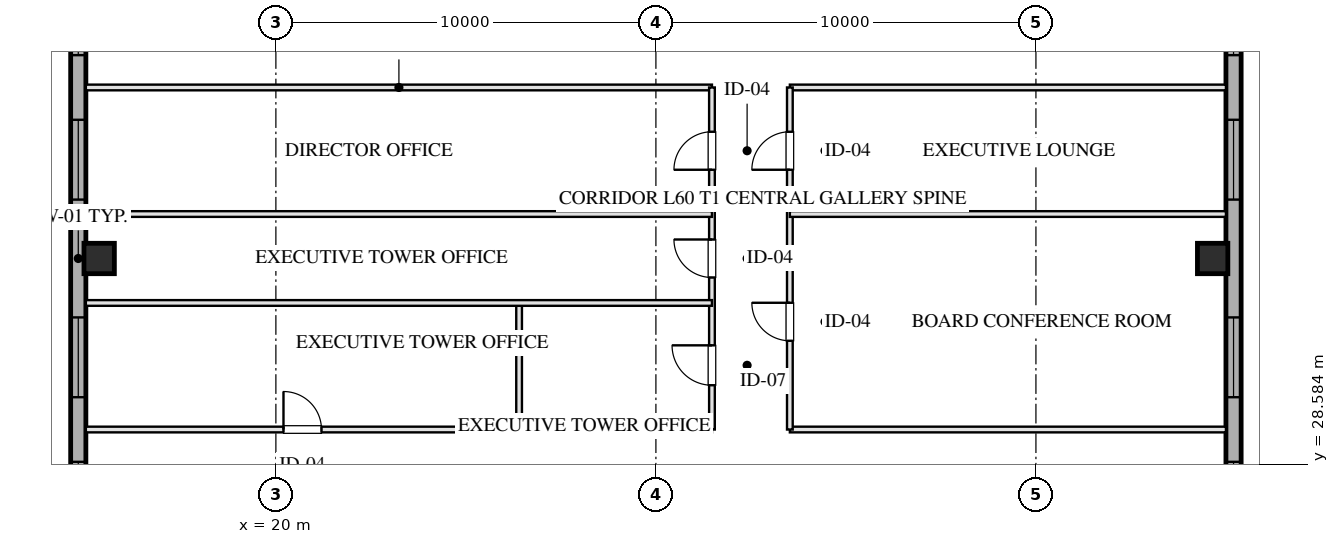
"""IFC4 building model, lengths in metres.
Left out: names, types, materials, properties, quantities, classifications, styles, units other than length and angle.
Written with IfcOpenShell. Run it as: python <this file> out.ifc"""

import sys

from ifc_helpers import new_model, si_unit, direction, frame, frame_2d, origin, origin_2d, place, context, subcontext, project, spatial, rectangle, hollow_rectangle, extrude, element, fill, save


model = new_model("IFC4")
c1 = context("Model", 3, precision=1e-05, world=origin(), true_north=direction((0.0, 1.0)))
c2 = subcontext(c1, "Body", "Model", "MODEL_VIEW")
j1 = project(units=[si_unit("LENGTHUNIT", "METRE"), si_unit("PLANEANGLEUNIT", "RADIAN")], contexts=[c1])
p1 = place(None, origin())
s1 = spatial("IfcSite", under=j1, at=p1, CompositionType="ELEMENT")
p2 = place(p1, origin())
s2 = spatial("IfcBuilding", under=s1, at=p2, CompositionType="ELEMENT")
p3 = place(p2, frame((0.0, 0.0, 223.1)))
s3 = spatial("IfcBuildingStorey", under=s2, at=p3, CompositionType="ELEMENT", Elevation=223.1)
for number, where, z_axis, x_axis in (
    (1, (15.35, 34.0, 0.0), (0.0, 0.0, 1.0), (1.0, 0.0, 0.0)),
    (2, (44.65, 34.0, 0.0), (0.0, 0.0, 1.0), (1.0, 0.0, 0.0)),
):
    element("IfcColumn", number, at=place(p3, frame(where, z_axis=z_axis, x_axis=x_axis)), inside=s3, PredefinedType="COLUMN", context=c2, shape_type="SweptSolid", body=[
        extrude(hollow_rectangle(XDim=0.8, YDim=0.8, WallThickness=0.028, at=origin_2d()), origin(), (0.0, 0.0, 1.0), 3.451),
    ])
p4 = place(p3, frame((14.8, 13.1, 0.0), z_axis=(0.0, 0.0, 1.0), x_axis=(0.0, 1.0, 0.0)))
e3 = element("IfcWall", 3, at=p4, inside=s3, PredefinedType="SOLIDWALL", context=c2, shape_type="SweptSolid", body=[
    extrude(rectangle(XDim=41.8, YDim=0.4, at=frame_2d((20.9, 0.0))), origin(), (0.0, 0.0, 1.0), 2.61),
])
p5 = place(p4, frame((13.45, 0.0, 0.75)))
e4 = element("IfcOpeningElement", 4, at=p5, cuts=e3, PredefinedType="OPENING", context=c2, shape_type="SweptSolid", body=[
    extrude(rectangle(XDim=2.1, YDim=1.46, at=frame_2d((1.05, 0.73))), frame((0.0, 0.21, 0.0), z_axis=(0.0, -1.0, 0.0), x_axis=(1.0, 0.0, 0.0)), (0.0, 0.0, 1.0), 0.42),
])
p6 = place(p4, frame((17.25, 0.0, 0.75)))
e5 = element("IfcOpeningElement", 5, at=p6, cuts=e3, PredefinedType="OPENING", context=c2, shape_type="SweptSolid", body=[
    extrude(rectangle(XDim=2.1, YDim=1.46, at=frame_2d((1.05, 0.73))), frame((0.0, 0.21, 0.0), z_axis=(0.0, -1.0, 0.0), x_axis=(1.0, 0.0, 0.0)), (0.0, 0.0, 1.0), 0.42),
])
p7 = place(p4, frame((22.45, 0.0, 0.75)))
e6 = element("IfcOpeningElement", 6, at=p7, cuts=e3, PredefinedType="OPENING", context=c2, shape_type="SweptSolid", body=[
    extrude(rectangle(XDim=2.1, YDim=1.46, at=frame_2d((1.05, 0.73))), frame((0.0, 0.21, 0.0), z_axis=(0.0, -1.0, 0.0), x_axis=(1.0, 0.0, 0.0)), (0.0, 0.0, 1.0), 0.42),
])
p8 = place(p4, frame((26.25, 0.0, 0.75)))
e7 = element("IfcOpeningElement", 7, at=p8, cuts=e3, PredefinedType="OPENING", context=c2, shape_type="SweptSolid", body=[
    extrude(rectangle(XDim=2.1, YDim=1.46, at=frame_2d((1.05, 0.73))), frame((0.0, 0.21, 0.0), z_axis=(0.0, -1.0, 0.0), x_axis=(1.0, 0.0, 0.0)), (0.0, 0.0, 1.0), 0.42),
])
p9 = place(p3, frame((45.2, 54.9, 0.0), z_axis=(0.0, 0.0, 1.0), x_axis=(0.0, -1.0, 0.0)))
e8 = element("IfcWall", 8, at=p9, inside=s3, PredefinedType="SOLIDWALL", context=c2, shape_type="SweptSolid", body=[
    extrude(rectangle(XDim=41.8, YDim=0.4, at=frame_2d((20.9, 0.0))), origin(), (0.0, 0.0, 1.0), 2.61),
])
p10 = place(p9, frame((26.25, 0.0, 0.75)))
e9 = element("IfcOpeningElement", 9, at=p10, cuts=e8, PredefinedType="OPENING", context=c2, shape_type="SweptSolid", body=[
    extrude(rectangle(XDim=2.1, YDim=1.46, at=frame_2d((1.05, 0.73))), frame((0.0, 0.21, 0.0), z_axis=(0.0, -1.0, 0.0), x_axis=(1.0, 0.0, 0.0)), (0.0, 0.0, 1.0), 0.42),
])
p11 = place(p9, frame((22.45, 0.0, 0.75)))
e10 = element("IfcOpeningElement", 10, at=p11, cuts=e8, PredefinedType="OPENING", context=c2, shape_type="SweptSolid", body=[
    extrude(rectangle(XDim=2.1, YDim=1.46, at=frame_2d((1.05, 0.73))), frame((0.0, 0.21, 0.0), z_axis=(0.0, -1.0, 0.0), x_axis=(1.0, 0.0, 0.0)), (0.0, 0.0, 1.0), 0.42),
])
p12 = place(p9, frame((17.25, 0.0, 0.75)))
e11 = element("IfcOpeningElement", 11, at=p12, cuts=e8, PredefinedType="OPENING", context=c2, shape_type="SweptSolid", body=[
    extrude(rectangle(XDim=2.1, YDim=1.46, at=frame_2d((1.05, 0.73))), frame((0.0, 0.21, 0.0), z_axis=(0.0, -1.0, 0.0), x_axis=(1.0, 0.0, 0.0)), (0.0, 0.0, 1.0), 0.42),
])
p13 = place(p9, frame((13.45, 0.0, 0.75)))
e12 = element("IfcOpeningElement", 12, at=p13, cuts=e8, PredefinedType="OPENING", context=c2, shape_type="SweptSolid", body=[
    extrude(rectangle(XDim=2.1, YDim=1.46, at=frame_2d((1.05, 0.73))), frame((0.0, 0.21, 0.0), z_axis=(0.0, -1.0, 0.0), x_axis=(1.0, 0.0, 0.0)), (0.0, 0.0, 1.0), 0.42),
])
p14 = place(p3, frame((15.0, 29.5, 0.0), z_axis=(0.0, 0.0, 1.0), x_axis=(1.0, 0.0, 0.0)))
e13 = element("IfcWall", 13, at=p14, inside=s3, PredefinedType="PARTITIONING", context=c2, shape_type="SweptSolid", body=[
    extrude(rectangle(XDim=16.475, YDim=0.15, at=frame_2d((8.238, 0.0))), origin(), (0.0, 0.0, 1.0), 3.175),
])
p15 = place(p14, frame((5.2, 0.0, 0.0)))
e14 = element("IfcOpeningElement", 14, at=p15, cuts=e13, PredefinedType="OPENING", context=c2, shape_type="SweptSolid", body=[
    extrude(rectangle(XDim=1.0, YDim=2.05, at=frame_2d((0.5, 1.025))), frame((0.0, 0.085, 0.0), z_axis=(0.0, -1.0, 0.0), x_axis=(1.0, 0.0, 0.0)), (0.0, 0.0, 1.0), 0.17),
])
p16 = place(p3, frame((33.525, 29.5, 0.0), z_axis=(0.0, 0.0, 1.0), x_axis=(1.0, 0.0, 0.0)))
e15 = element("IfcWall", 15, at=p16, inside=s3, PredefinedType="PARTITIONING", context=c2, shape_type="SweptSolid", body=[
    extrude(rectangle(XDim=11.475, YDim=0.15, at=frame_2d((5.738, 0.0))), origin(), (0.0, 0.0, 1.0), 3.175),
])
p17 = place(p3, frame((15.0, 38.5, 0.0), z_axis=(0.0, 0.0, 1.0), x_axis=(1.0, 0.0, 0.0)))
e16 = element("IfcWall", 16, at=p17, inside=s3, PredefinedType="PARTITIONING", context=c2, shape_type="SweptSolid", body=[
    extrude(rectangle(XDim=16.475, YDim=0.15, at=frame_2d((8.238, 0.0))), origin(), (0.0, 0.0, 1.0), 3.175),
])
p18 = place(p3, frame((33.525, 38.5, 0.0), z_axis=(0.0, 0.0, 1.0), x_axis=(1.0, 0.0, 0.0)))
e17 = element("IfcWall", 17, at=p18, inside=s3, PredefinedType="PARTITIONING", context=c2, shape_type="SweptSolid", body=[
    extrude(rectangle(XDim=11.475, YDim=0.15, at=frame_2d((5.738, 0.0))), origin(), (0.0, 0.0, 1.0), 3.175),
])
p19 = place(p3, frame((31.475, 29.5, 0.0), z_axis=(0.0, 0.0, 1.0), x_axis=(0.0, 1.0, 0.0)))
e18 = element("IfcWall", 18, at=p19, inside=s3, PredefinedType="PARTITIONING", context=c2, shape_type="SweptSolid", body=[
    extrude(rectangle(XDim=9.0, YDim=0.15, at=frame_2d((4.5, 0.0))), origin(), (0.0, 0.0, 1.0), 3.175),
])
p20 = place(p19, frame((1.165, 0.0, 0.0)))
e19 = element("IfcOpeningElement", 19, at=p20, cuts=e18, PredefinedType="OPENING", context=c2, shape_type="SweptSolid", body=[
    extrude(rectangle(XDim=1.05, YDim=2.05, at=frame_2d((0.525, 1.025))), frame((0.0, 0.085, 0.0), z_axis=(0.0, -1.0, 0.0), x_axis=(1.0, 0.0, 0.0)), (0.0, 0.0, 1.0), 0.17),
])
p21 = place(p19, frame((4.0, 0.0, 0.0)))
e20 = element("IfcOpeningElement", 20, at=p21, cuts=e18, PredefinedType="OPENING", context=c2, shape_type="SweptSolid", body=[
    extrude(rectangle(XDim=1.0, YDim=2.05, at=frame_2d((0.5, 1.025))), frame((0.0, 0.085, 0.0), z_axis=(0.0, -1.0, 0.0), x_axis=(1.0, 0.0, 0.0)), (0.0, 0.0, 1.0), 0.17),
])
p22 = place(p19, frame((6.835, 0.0, 0.0)))
e21 = element("IfcOpeningElement", 21, at=p22, cuts=e18, PredefinedType="OPENING", context=c2, shape_type="SweptSolid", body=[
    extrude(rectangle(XDim=1.0, YDim=2.05, at=frame_2d((0.5, 1.025))), frame((0.0, 0.085, 0.0), z_axis=(0.0, -1.0, 0.0), x_axis=(1.0, 0.0, 0.0)), (0.0, 0.0, 1.0), 0.17),
])
p23 = place(p3, frame((33.525, 29.5, 0.0), z_axis=(0.0, 0.0, 1.0), x_axis=(0.0, 1.0, 0.0)))
e22 = element("IfcWall", 22, at=p23, inside=s3, PredefinedType="PARTITIONING", context=c2, shape_type="SweptSolid", body=[
    extrude(rectangle(XDim=9.0, YDim=0.15, at=frame_2d((4.5, 0.0))), origin(), (0.0, 0.0, 1.0), 3.175),
])
p24 = place(p23, frame((2.335, 0.0, 0.0)))
e23 = element("IfcOpeningElement", 23, at=p24, cuts=e22, PredefinedType="OPENING", context=c2, shape_type="SweptSolid", body=[
    extrude(rectangle(XDim=1.0, YDim=2.05, at=frame_2d((0.5, 1.025))), frame((0.0, 0.085, 0.0), z_axis=(0.0, -1.0, 0.0), x_axis=(1.0, 0.0, 0.0)), (0.0, 0.0, 1.0), 0.17),
])
p25 = place(p23, frame((6.835, 0.0, 0.0)))
e24 = element("IfcOpeningElement", 24, at=p25, cuts=e22, PredefinedType="OPENING", context=c2, shape_type="SweptSolid", body=[
    extrude(rectangle(XDim=1.0, YDim=2.05, at=frame_2d((0.5, 1.025))), frame((0.0, 0.085, 0.0), z_axis=(0.0, -1.0, 0.0), x_axis=(1.0, 0.0, 0.0)), (0.0, 0.0, 1.0), 0.17),
])
p26 = place(p3, frame((26.4, 29.5, 0.0), z_axis=(0.0, 0.0, 1.0), x_axis=(0.0, 1.0, 0.0)))
e25 = element("IfcWall", 25, at=p26, inside=s3, PredefinedType="PARTITIONING", context=c2, shape_type="SweptSolid", body=[
    extrude(rectangle(XDim=3.33, YDim=0.15, at=frame_2d((1.665, 0.0))), origin(), (0.0, 0.0, 1.0), 3.175),
])
for number, where, z_axis, x_axis in (
    (26, (15.0, 32.83, 0.0), (0.0, 0.0, 1.0), (1.0, 0.0, 0.0)),
    (27, (15.0, 35.17, 0.0), (0.0, 0.0, 1.0), (1.0, 0.0, 0.0)),
):
    element("IfcWall", number, at=place(p3, frame(where, z_axis=z_axis, x_axis=x_axis)), inside=s3, PredefinedType="PARTITIONING", context=c2, shape_type="SweptSolid", body=[
        extrude(rectangle(XDim=16.475, YDim=0.15, at=frame_2d((8.238, 0.0))), origin(), (0.0, 0.0, 1.0), 3.175),
    ])
p27 = place(p3, frame((33.525, 35.17, 0.0), z_axis=(0.0, 0.0, 1.0), x_axis=(1.0, 0.0, 0.0)))
e28 = element("IfcWall", 28, at=p27, inside=s3, PredefinedType="PARTITIONING", context=c2, shape_type="SweptSolid", body=[
    extrude(rectangle(XDim=11.475, YDim=0.15, at=frame_2d((5.738, 0.0))), origin(), (0.0, 0.0, 1.0), 3.175),
])
p28 = place(p5, origin())
e29 = element("IfcWindow", 29, at=p28, inside=s3, PartitioningType="TRIPLE_PANEL_VERTICAL", PredefinedType="WINDOW", context=c2, shape_type="SweptSolid", body=[
    extrude(rectangle(XDim=2.1, YDim=1.46, at=frame_2d((1.05, 0.73))), frame((0.0, 0.03, 0.0), z_axis=(0.0, -1.0, 0.0), x_axis=(1.0, 0.0, 0.0)), (0.0, 0.0, 1.0), 0.06),
])
fill(e4, e29)
p29 = place(p6, origin())
e30 = element("IfcWindow", 30, at=p29, inside=s3, PartitioningType="TRIPLE_PANEL_VERTICAL", PredefinedType="WINDOW", context=c2, shape_type="SweptSolid", body=[
    extrude(rectangle(XDim=2.1, YDim=1.46, at=frame_2d((1.05, 0.73))), frame((0.0, 0.03, 0.0), z_axis=(0.0, -1.0, 0.0), x_axis=(1.0, 0.0, 0.0)), (0.0, 0.0, 1.0), 0.06),
])
fill(e5, e30)
p30 = place(p7, origin())
e31 = element("IfcWindow", 31, at=p30, inside=s3, PartitioningType="TRIPLE_PANEL_VERTICAL", PredefinedType="WINDOW", context=c2, shape_type="SweptSolid", body=[
    extrude(rectangle(XDim=2.1, YDim=1.46, at=frame_2d((1.05, 0.73))), frame((0.0, 0.03, 0.0), z_axis=(0.0, -1.0, 0.0), x_axis=(1.0, 0.0, 0.0)), (0.0, 0.0, 1.0), 0.06),
])
fill(e6, e31)
p31 = place(p8, origin())
e32 = element("IfcWindow", 32, at=p31, inside=s3, PartitioningType="TRIPLE_PANEL_VERTICAL", PredefinedType="WINDOW", context=c2, shape_type="SweptSolid", body=[
    extrude(rectangle(XDim=2.1, YDim=1.46, at=frame_2d((1.05, 0.73))), frame((0.0, 0.03, 0.0), z_axis=(0.0, -1.0, 0.0), x_axis=(1.0, 0.0, 0.0)), (0.0, 0.0, 1.0), 0.06),
])
fill(e7, e32)
p32 = place(p10, origin())
e33 = element("IfcWindow", 33, at=p32, inside=s3, PartitioningType="TRIPLE_PANEL_VERTICAL", PredefinedType="WINDOW", context=c2, shape_type="SweptSolid", body=[
    extrude(rectangle(XDim=2.1, YDim=1.46, at=frame_2d((1.05, 0.73))), frame((0.0, 0.03, 0.0), z_axis=(0.0, -1.0, 0.0), x_axis=(1.0, 0.0, 0.0)), (0.0, 0.0, 1.0), 0.06),
])
fill(e9, e33)
p33 = place(p11, origin())
e34 = element("IfcWindow", 34, at=p33, inside=s3, PartitioningType="TRIPLE_PANEL_VERTICAL", PredefinedType="WINDOW", context=c2, shape_type="SweptSolid", body=[
    extrude(rectangle(XDim=2.1, YDim=1.46, at=frame_2d((1.05, 0.73))), frame((0.0, 0.03, 0.0), z_axis=(0.0, -1.0, 0.0), x_axis=(1.0, 0.0, 0.0)), (0.0, 0.0, 1.0), 0.06),
])
fill(e10, e34)
p34 = place(p12, origin())
e35 = element("IfcWindow", 35, at=p34, inside=s3, PartitioningType="TRIPLE_PANEL_VERTICAL", PredefinedType="WINDOW", context=c2, shape_type="SweptSolid", body=[
    extrude(rectangle(XDim=2.1, YDim=1.46, at=frame_2d((1.05, 0.73))), frame((0.0, 0.03, 0.0), z_axis=(0.0, -1.0, 0.0), x_axis=(1.0, 0.0, 0.0)), (0.0, 0.0, 1.0), 0.06),
])
fill(e11, e35)
p35 = place(p13, origin())
e36 = element("IfcWindow", 36, at=p35, inside=s3, PartitioningType="TRIPLE_PANEL_VERTICAL", PredefinedType="WINDOW", context=c2, shape_type="SweptSolid", body=[
    extrude(rectangle(XDim=2.1, YDim=1.46, at=frame_2d((1.05, 0.73))), frame((0.0, 0.03, 0.0), z_axis=(0.0, -1.0, 0.0), x_axis=(1.0, 0.0, 0.0)), (0.0, 0.0, 1.0), 0.06),
])
fill(e12, e36)
p36 = place(p15, origin())
e37 = element("IfcDoor", 37, at=p36, inside=s3, OperationType="SINGLE_SWING_LEFT", PredefinedType="DOOR", context=c2, shape_type="SweptSolid", body=[
    extrude(rectangle(XDim=1.0, YDim=2.05, at=frame_2d((0.5, 1.025))), frame((0.0, 0.025, 0.0), z_axis=(0.0, -1.0, 0.0), x_axis=(1.0, 0.0, 0.0)), (0.0, 0.0, 1.0), 0.05),
])
fill(e14, e37)
p37 = place(p20, origin())
e38 = element("IfcDoor", 38, at=p37, inside=s3, OperationType="SINGLE_SWING_RIGHT", PredefinedType="DOOR", context=c2, shape_type="SweptSolid", body=[
    extrude(rectangle(XDim=1.05, YDim=2.05, at=frame_2d((0.525, 1.025))), frame((0.0, 0.025, 0.0), z_axis=(0.0, -1.0, 0.0), x_axis=(1.0, 0.0, 0.0)), (0.0, 0.0, 1.0), 0.05),
])
fill(e19, e38)
p38 = place(p21, origin())
e39 = element("IfcDoor", 39, at=p38, inside=s3, OperationType="SINGLE_SWING_RIGHT", PredefinedType="DOOR", context=c2, shape_type="SweptSolid", body=[
    extrude(rectangle(XDim=1.0, YDim=2.05, at=frame_2d((0.5, 1.025))), frame((0.0, 0.025, 0.0), z_axis=(0.0, -1.0, 0.0), x_axis=(1.0, 0.0, 0.0)), (0.0, 0.0, 1.0), 0.05),
])
fill(e20, e39)
p39 = place(p22, origin())
e40 = element("IfcDoor", 40, at=p39, inside=s3, OperationType="SINGLE_SWING_LEFT", PredefinedType="DOOR", context=c2, shape_type="SweptSolid", body=[
    extrude(rectangle(XDim=1.0, YDim=2.05, at=frame_2d((0.5, 1.025))), frame((0.0, 0.025, 0.0), z_axis=(0.0, -1.0, 0.0), x_axis=(1.0, 0.0, 0.0)), (0.0, 0.0, 1.0), 0.05),
])
fill(e21, e40)
p40 = place(p24, origin())
e41 = element("IfcDoor", 41, at=p40, inside=s3, OperationType="SINGLE_SWING_RIGHT", PredefinedType="DOOR", context=c2, shape_type="SweptSolid", body=[
    extrude(rectangle(XDim=1.0, YDim=2.05, at=frame_2d((0.5, 1.025))), frame((0.0, 0.025, 0.0), z_axis=(0.0, -1.0, 0.0), x_axis=(1.0, 0.0, 0.0)), (0.0, 0.0, 1.0), 0.05),
])
fill(e23, e41)
p41 = place(p25, origin())
e42 = element("IfcDoor", 42, at=p41, inside=s3, OperationType="SINGLE_SWING_LEFT", PredefinedType="DOOR", context=c2, shape_type="SweptSolid", body=[
    extrude(rectangle(XDim=1.0, YDim=2.05, at=frame_2d((0.5, 1.025))), frame((0.0, 0.025, 0.0), z_axis=(0.0, -1.0, 0.0), x_axis=(1.0, 0.0, 0.0)), (0.0, 0.0, 1.0), 0.05),
])
fill(e24, e42)
save(model, sys.argv[1])
